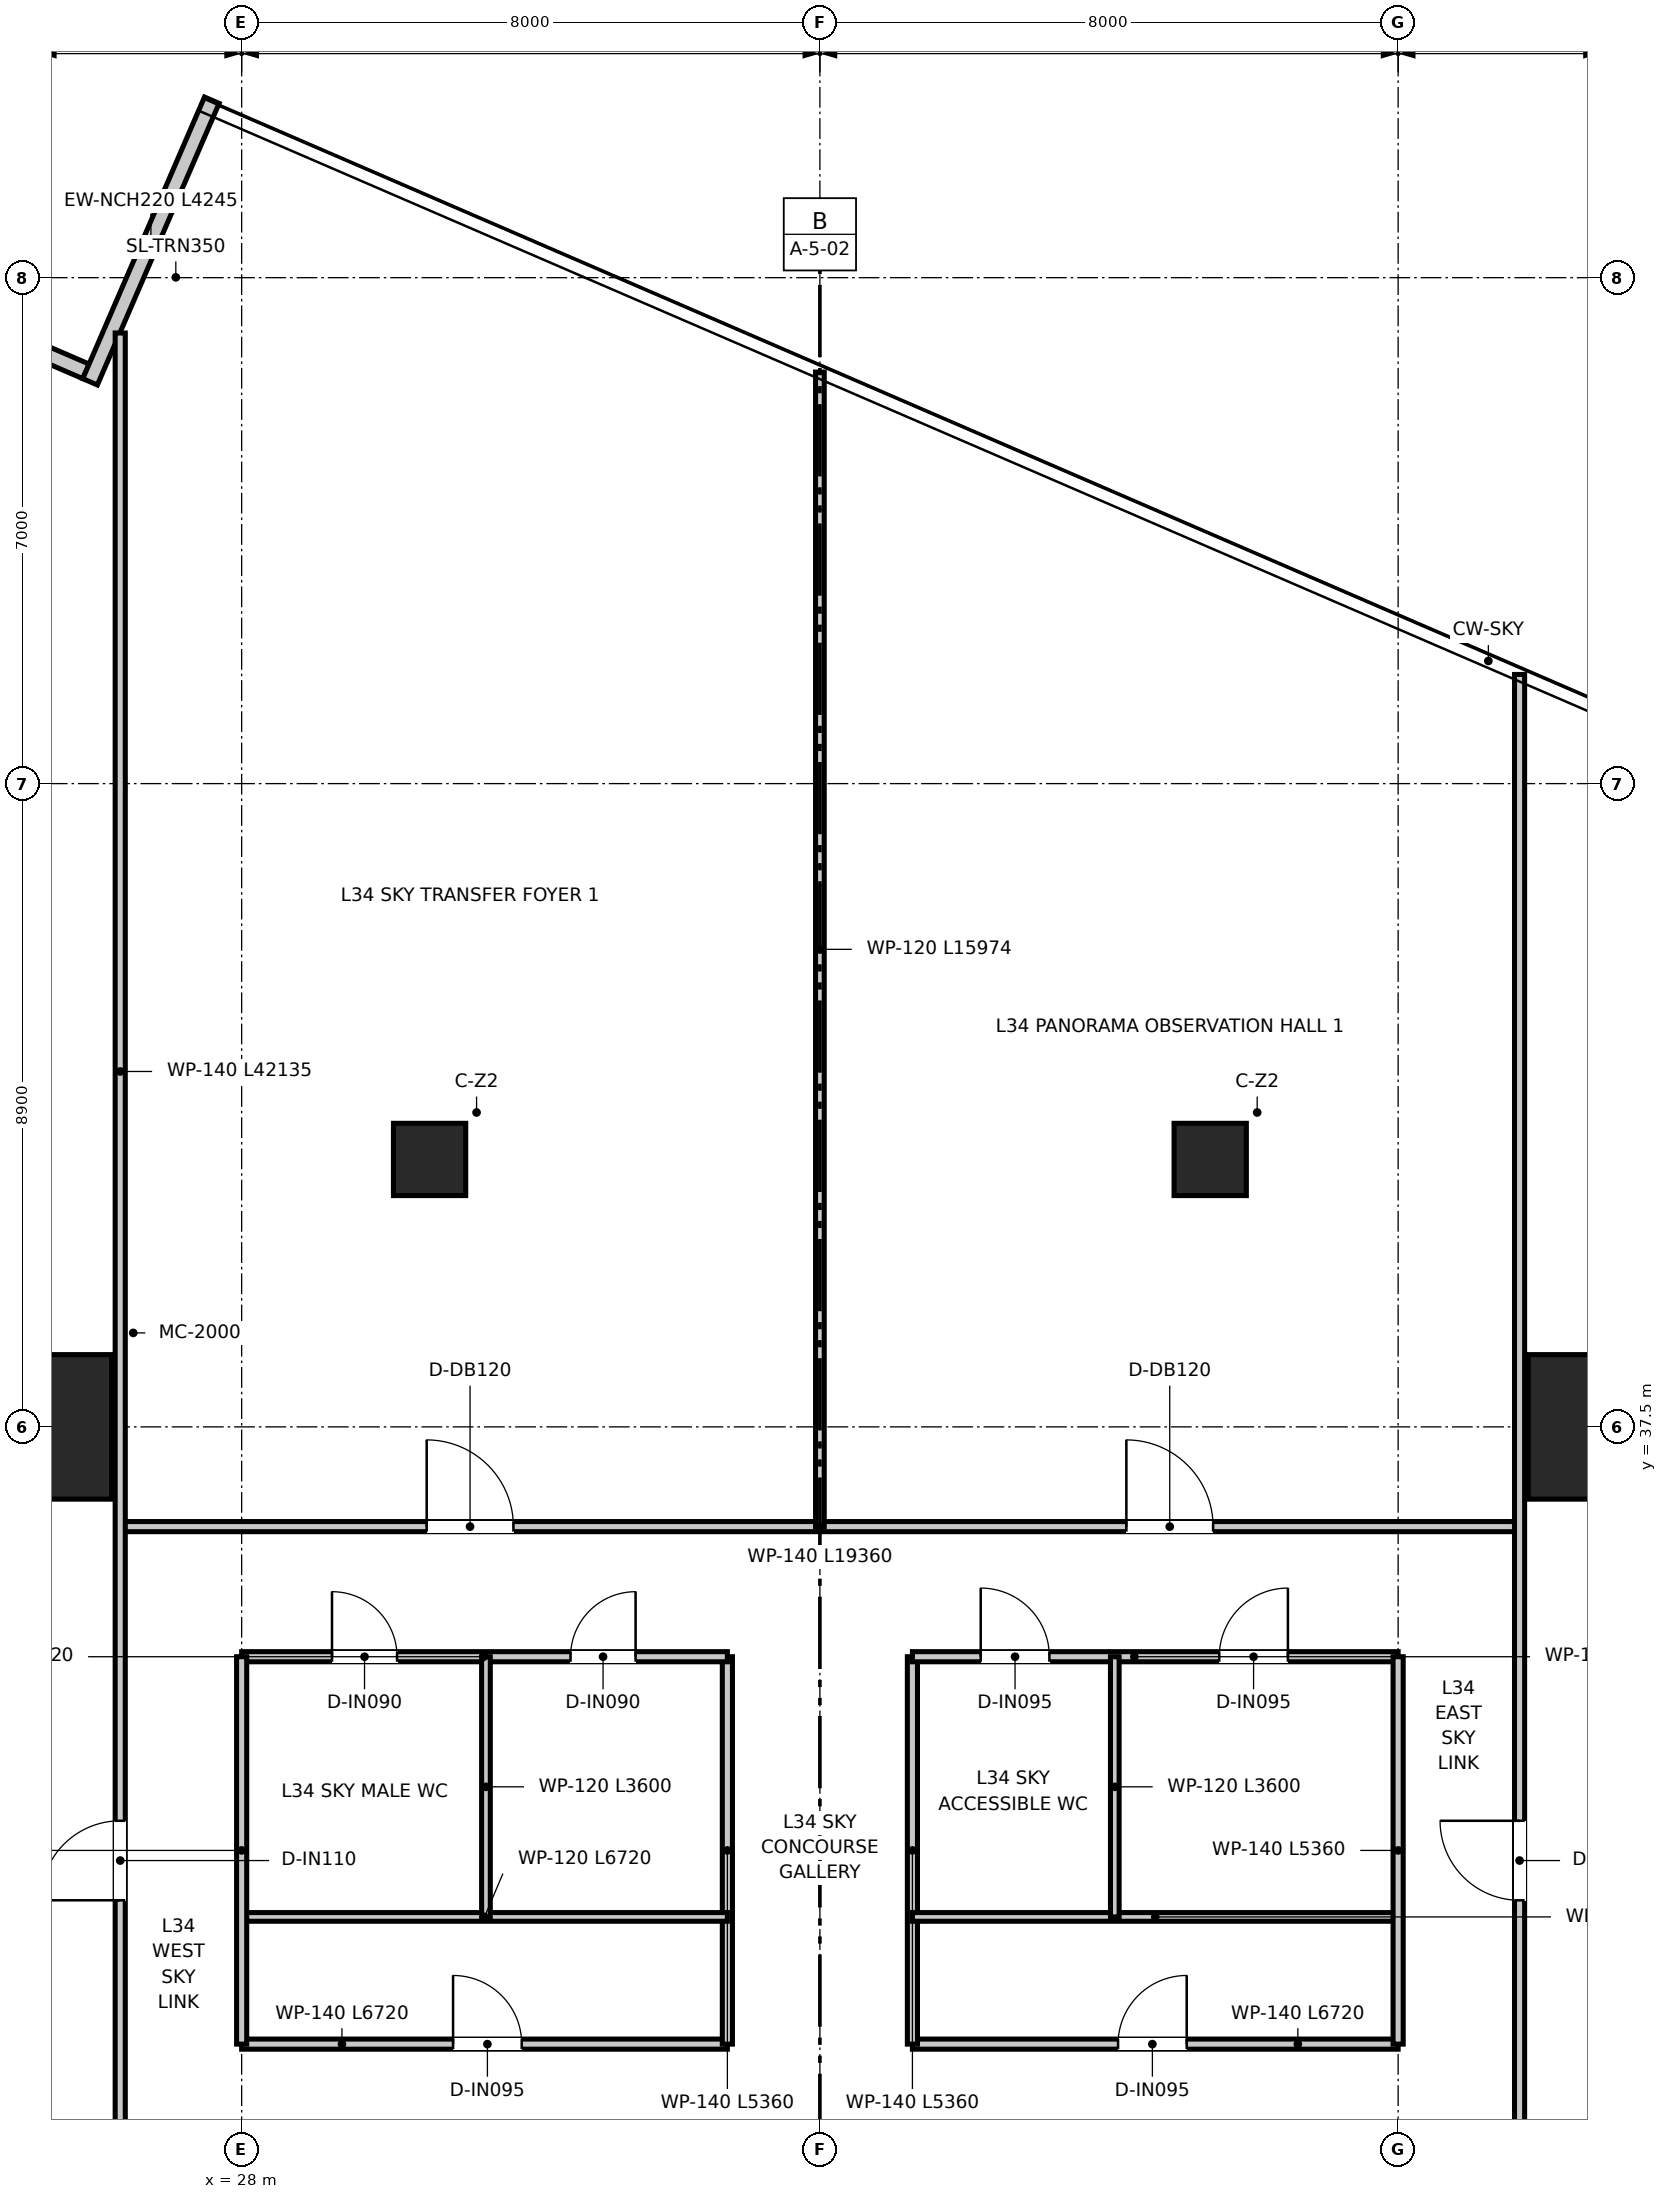
"""IFC4 building model, lengths in metres.
Left out: names, types, materials, properties, quantities, classifications, styles, units other than length and angle.
Written with IfcOpenShell. Run it as: python <this file> out.ifc"""

import sys

from ifc_helpers import new_model, si_unit, direction, frame, frame_2d, origin, origin_2d, place, context, subcontext, project, spatial, rectangle, extrude, source, transform, mapped, element, fill, save


model = new_model("IFC4")
c1 = context("Model", 3, precision=1e-05, world=origin(), true_north=direction((0.0, 1.0)))
c2 = subcontext(c1, "Body", "Model", "MODEL_VIEW")
j1 = project(units=[si_unit("LENGTHUNIT", "METRE"), si_unit("PLANEANGLEUNIT", "RADIAN")], contexts=[c1])
p1 = place(None, origin())
s1 = spatial("IfcSite", under=j1, at=p1, CompositionType="ELEMENT")
p2 = place(p1, origin())
s2 = spatial("IfcBuilding", under=s1, at=p2, CompositionType="ELEMENT")
p3 = place(p2, frame((0.0, 0.0, 141.4)))
s3 = spatial("IfcBuildingStorey", under=s2, at=p3, CompositionType="ELEMENT", Elevation=141.4)
m1 = source(origin(), c2, "Body", "SweptSolid", [
    extrude(rectangle(XDim=2.0, YDim=2.0, at=origin_2d()), origin(), (0.0, 0.0, 1.0), 4.8),
])
for number, where, z_axis, x_axis in (
    (1, (46.8, 37.5, 0.0), (0.0, 0.0, 1.0), (1.0, 0.0, 0.0)),
    (2, (25.2, 37.5, 0.0), (0.0, 0.0, 1.0), (1.0, 0.0, 0.0)),
):
    element("IfcColumn", number, at=place(p3, frame(where, z_axis=z_axis, x_axis=x_axis)), inside=s3, PredefinedType="USERDEFINED", context=c2, shape_type="MappedRepresentation", body=[
        mapped(m1, transform((0.0, 0.0, 0.0), x_axis=(1.0, 0.0, 0.0), y_axis=(0.0, 1.0, 0.0), z_axis=(0.0, 0.0, 1.0), scale=1.0)),
    ])
m2 = source(origin(), c2, "Body", "SweptSolid", [
    extrude(rectangle(XDim=1.0, YDim=1.0, at=origin_2d()), origin(), (0.0, 0.0, 1.0), 4.8),
])
for number, where, z_axis, x_axis in (
    (3, (30.6, 41.2, 0.0), (0.0, 0.0, 1.0), (1.0, 0.0, 0.0)),
    (4, (41.4, 41.2, 0.0), (0.0, 0.0, 1.0), (1.0, 0.0, 0.0)),
):
    element("IfcColumn", number, at=place(p3, frame(where, z_axis=z_axis, x_axis=x_axis)), inside=s3, PredefinedType="COLUMN", context=c2, shape_type="MappedRepresentation", body=[
        mapped(m2, transform((0.0, 0.0, 0.0), x_axis=(1.0, 0.0, 0.0), y_axis=(0.0, 1.0, 0.0), z_axis=(0.0, 0.0, 1.0), scale=1.0)),
    ])
p4 = place(p3, frame((25.845, 52.104, 0.0), z_axis=(0.0, 0.0, 1.0), x_axis=(-0.91792331666, 0.396757841424, 0.0)))
e5 = element("IfcWall", 5, at=p4, inside=s3, PredefinedType="ELEMENTEDWALL", context=c2, shape_type="SweptSolid", body=[
    extrude(rectangle(XDim=4.025, YDim=0.22, at=frame_2d((2.012, 0.0))), origin(), (0.0, 0.0, 1.0), 4.52),
])
p5 = place(p3, frame((27.587, 55.856, 0.0), z_axis=(0.0, 0.0, 1.0), x_axis=(-0.396735661984, -0.917932903054, 0.0)))
e6 = element("IfcWall", 6, at=p5, inside=s3, PredefinedType="ELEMENTEDWALL", context=c2, shape_type="SweptSolid", body=[
    extrude(rectangle(XDim=4.245, YDim=0.22, at=frame_2d((2.123, 0.0))), origin(), (0.0, 0.0, 1.0), 4.52),
])
p6 = place(p3, frame((28.0, 28.96, 0.0), z_axis=(0.0, 0.0, 1.0), x_axis=(1.0, 0.0, 0.0)))
e7 = element("IfcWall", 7, at=p6, inside=s3, PredefinedType="PARTITIONING", context=c2, shape_type="SweptSolid", body=[
    extrude(rectangle(XDim=6.72, YDim=0.14, at=frame_2d((3.36, 0.0))), origin(), (0.0, 0.0, 1.0), 3.93),
])
p7 = place(p6, frame((2.925, 0.0, 0.0)))
e8 = element("IfcOpeningElement", 8, at=p7, cuts=e7, PredefinedType="OPENING", context=c2, shape_type="SweptSolid", body=[
    extrude(rectangle(XDim=0.95, YDim=2.1, at=frame_2d((0.475, 1.05))), frame((0.0, 0.08, 0.0), z_axis=(0.0, -1.0, 0.0), x_axis=(1.0, 0.0, 0.0)), (0.0, 0.0, 1.0), 0.16),
])
p8 = place(p3, frame((37.28, 28.96, 0.0), z_axis=(0.0, 0.0, 1.0), x_axis=(1.0, 0.0, 0.0)))
e9 = element("IfcWall", 9, at=p8, inside=s3, PredefinedType="PARTITIONING", context=c2, shape_type="SweptSolid", body=[
    extrude(rectangle(XDim=6.72, YDim=0.14, at=frame_2d((3.36, 0.0))), origin(), (0.0, 0.0, 1.0), 3.93),
])
p9 = place(p8, frame((2.845, 0.0, 0.0)))
e10 = element("IfcOpeningElement", 10, at=p9, cuts=e9, PredefinedType="OPENING", context=c2, shape_type="SweptSolid", body=[
    extrude(rectangle(XDim=0.95, YDim=2.1, at=frame_2d((0.475, 1.05))), frame((0.0, 0.08, 0.0), z_axis=(0.0, -1.0, 0.0), x_axis=(1.0, 0.0, 0.0)), (0.0, 0.0, 1.0), 0.16),
])
for number, where, z_axis, x_axis in (
    (11, (34.72, 28.96, 0.0), (0.0, 0.0, 1.0), (0.0, 1.0, 0.0)),
    (12, (37.28, 28.96, 0.0), (0.0, 0.0, 1.0), (0.0, 1.0, 0.0)),
):
    element("IfcWall", number, at=place(p3, frame(where, z_axis=z_axis, x_axis=x_axis)), inside=s3, PredefinedType="PARTITIONING", context=c2, shape_type="SweptSolid", body=[
        extrude(rectangle(XDim=5.36, YDim=0.14, at=frame_2d((2.68, 0.0))), origin(), (0.0, 0.0, 1.0), 4.02),
    ])
for number, where, z_axis, x_axis in (
    (13, (28.0, 30.72, 0.0), (0.0, 0.0, 1.0), (1.0, 0.0, 0.0)),
    (14, (37.28, 30.72, 0.0), (0.0, 0.0, 1.0), (1.0, 0.0, 0.0)),
):
    element("IfcWall", number, at=place(p3, frame(where, z_axis=z_axis, x_axis=x_axis)), inside=s3, PredefinedType="PARTITIONING", context=c2, shape_type="SweptSolid", body=[
        extrude(rectangle(XDim=6.72, YDim=0.12, at=frame_2d((3.36, 0.0))), origin(), (0.0, 0.0, 1.0), 3.93),
    ])
p10 = place(p3, frame((28.0, 34.32, 0.0), z_axis=(0.0, 0.0, 1.0), x_axis=(1.0, 0.0, 0.0)))
e15 = element("IfcWall", 15, at=p10, inside=s3, PredefinedType="PARTITIONING", context=c2, shape_type="SweptSolid", body=[
    extrude(rectangle(XDim=6.72, YDim=0.14, at=frame_2d((3.36, 0.0))), origin(), (0.0, 0.0, 1.0), 3.93),
])
p11 = place(p10, frame((1.25, 0.0, 0.0)))
e16 = element("IfcOpeningElement", 16, at=p11, cuts=e15, PredefinedType="OPENING", context=c2, shape_type="SweptSolid", body=[
    extrude(rectangle(XDim=0.9, YDim=2.1, at=frame_2d((0.45, 1.05))), frame((0.0, 0.08, 0.0), z_axis=(0.0, -1.0, 0.0), x_axis=(1.0, 0.0, 0.0)), (0.0, 0.0, 1.0), 0.16),
])
p12 = place(p10, frame((4.55, 0.0, 0.0)))
e17 = element("IfcOpeningElement", 17, at=p12, cuts=e15, PredefinedType="OPENING", context=c2, shape_type="SweptSolid", body=[
    extrude(rectangle(XDim=0.9, YDim=2.1, at=frame_2d((0.45, 1.05))), frame((0.0, 0.08, 0.0), z_axis=(0.0, -1.0, 0.0), x_axis=(1.0, 0.0, 0.0)), (0.0, 0.0, 1.0), 0.16),
])
p13 = place(p3, frame((37.28, 34.32, 0.0), z_axis=(0.0, 0.0, 1.0), x_axis=(1.0, 0.0, 0.0)))
e18 = element("IfcWall", 18, at=p13, inside=s3, PredefinedType="PARTITIONING", context=c2, shape_type="SweptSolid", body=[
    extrude(rectangle(XDim=6.72, YDim=0.14, at=frame_2d((3.36, 0.0))), origin(), (0.0, 0.0, 1.0), 3.93),
])
p14 = place(p13, frame((0.945, 0.0, 0.0)))
e19 = element("IfcOpeningElement", 19, at=p14, cuts=e18, PredefinedType="OPENING", context=c2, shape_type="SweptSolid", body=[
    extrude(rectangle(XDim=0.95, YDim=2.1, at=frame_2d((0.475, 1.05))), frame((0.0, 0.08, 0.0), z_axis=(0.0, -1.0, 0.0), x_axis=(1.0, 0.0, 0.0)), (0.0, 0.0, 1.0), 0.16),
])
p15 = place(p13, frame((4.245, 0.0, 0.0)))
e20 = element("IfcOpeningElement", 20, at=p15, cuts=e18, PredefinedType="OPENING", context=c2, shape_type="SweptSolid", body=[
    extrude(rectangle(XDim=0.95, YDim=2.1, at=frame_2d((0.475, 1.05))), frame((0.0, 0.08, 0.0), z_axis=(0.0, -1.0, 0.0), x_axis=(1.0, 0.0, 0.0)), (0.0, 0.0, 1.0), 0.16),
])
for number, where, z_axis, x_axis in (
    (21, (28.0, 28.96, 0.0), (0.0, 0.0, 1.0), (0.0, 1.0, 0.0)),
    (22, (44.0, 28.96, 0.0), (0.0, 0.0, 1.0), (0.0, 1.0, 0.0)),
):
    element("IfcWall", number, at=place(p3, frame(where, z_axis=z_axis, x_axis=x_axis)), inside=s3, PredefinedType="PARTITIONING", context=c2, shape_type="SweptSolid", body=[
        extrude(rectangle(XDim=5.36, YDim=0.14, at=frame_2d((2.68, 0.0))), origin(), (0.0, 0.0, 1.0), 4.12),
    ])
for number, where, z_axis, x_axis in (
    (23, (31.38, 30.72, 0.0), (0.0, 0.0, 1.0), (0.0, 1.0, 0.0)),
    (24, (40.08, 30.72, 0.0), (0.0, 0.0, 1.0), (0.0, 1.0, 0.0)),
):
    element("IfcWall", number, at=place(p3, frame(where, z_axis=z_axis, x_axis=x_axis)), inside=s3, PredefinedType="PARTITIONING", context=c2, shape_type="SweptSolid", body=[
        extrude(rectangle(XDim=3.6, YDim=0.12, at=frame_2d((1.8, 0.0))), origin(), (0.0, 0.0, 1.0), 4.02),
    ])
p16 = place(p3, frame((26.32, 36.12, 0.0), z_axis=(0.0, 0.0, 1.0), x_axis=(1.0, 0.0, 0.0)))
e25 = element("IfcWall", 25, at=p16, inside=s3, PredefinedType="PARTITIONING", context=c2, shape_type="SweptSolid", body=[
    extrude(rectangle(XDim=19.36, YDim=0.14, at=frame_2d((9.68, 0.0))), origin(), (0.0, 0.0, 1.0), 3.93),
])
p17 = place(p16, frame((4.24, 0.0, 0.0)))
e26 = element("IfcOpeningElement", 26, at=p17, cuts=e25, PredefinedType="OPENING", context=c2, shape_type="SweptSolid", body=[
    extrude(rectangle(XDim=1.2, YDim=2.15, at=frame_2d((0.6, 1.075))), frame((0.0, 0.08, 0.0), z_axis=(0.0, -1.0, 0.0), x_axis=(1.0, 0.0, 0.0)), (0.0, 0.0, 1.0), 0.16),
])
p18 = place(p16, frame((13.92, 0.0, 0.0)))
e27 = element("IfcOpeningElement", 27, at=p18, cuts=e25, PredefinedType="OPENING", context=c2, shape_type="SweptSolid", body=[
    extrude(rectangle(XDim=1.2, YDim=2.15, at=frame_2d((0.6, 1.075))), frame((0.0, 0.08, 0.0), z_axis=(0.0, -1.0, 0.0), x_axis=(1.0, 0.0, 0.0)), (0.0, 0.0, 1.0), 0.16),
])
p19 = place(p3, frame((26.32, 10.5, 0.0), z_axis=(0.0, 0.0, 1.0), x_axis=(0.0, 1.0, 0.0)))
e28 = element("IfcWall", 28, at=p19, inside=s3, PredefinedType="PARTITIONING", context=c2, shape_type="SweptSolid", body=[
    extrude(rectangle(XDim=42.135, YDim=0.14, at=frame_2d((21.067, 0.0))), origin(), (0.0, 0.0, 1.0), 3.82),
])
p20 = place(p19, frame((20.45, 0.0, 0.0)))
e29 = element("IfcOpeningElement", 29, at=p20, cuts=e28, PredefinedType="OPENING", context=c2, shape_type="SweptSolid", body=[
    extrude(rectangle(XDim=1.1, YDim=2.15, at=frame_2d((0.55, 1.075))), frame((0.0, 0.08, 0.0), z_axis=(0.0, -1.0, 0.0), x_axis=(1.0, 0.0, 0.0)), (0.0, 0.0, 1.0), 0.16),
])
p21 = place(p3, frame((45.68, 0.765, 0.0), z_axis=(0.0, 0.0, 1.0), x_axis=(0.0, 1.0, 0.0)))
e30 = element("IfcWall", 30, at=p21, inside=s3, PredefinedType="PARTITIONING", context=c2, shape_type="SweptSolid", body=[
    extrude(rectangle(XDim=47.145, YDim=0.14, at=frame_2d((23.573, 0.0))), origin(), (0.0, 0.0, 1.0), 3.82),
])
p22 = place(p21, frame((30.185, 0.0, 0.0)))
e31 = element("IfcOpeningElement", 31, at=p22, cuts=e30, PredefinedType="OPENING", context=c2, shape_type="SweptSolid", body=[
    extrude(rectangle(XDim=1.1, YDim=2.15, at=frame_2d((0.55, 1.075))), frame((0.0, 0.08, 0.0), z_axis=(0.0, -1.0, 0.0), x_axis=(1.0, 0.0, 0.0)), (0.0, 0.0, 1.0), 0.16),
])
p23 = place(p3, frame((36.0, 36.12, 0.0), z_axis=(0.0, 0.0, 1.0), x_axis=(0.0, 1.0, 0.0)))
e32 = element("IfcWall", 32, at=p23, inside=s3, PredefinedType="PARTITIONING", context=c2, shape_type="SweptSolid", body=[
    extrude(rectangle(XDim=15.974, YDim=0.12, at=frame_2d((7.987, 0.0))), origin(), (0.0, 0.0, 1.0), 3.82),
])
p24 = place(p7, origin())
e33 = element("IfcDoor", 33, at=p24, inside=s3, OperationType="SINGLE_SWING_LEFT", PredefinedType="DOOR", context=c2, shape_type="SweptSolid", body=[
    extrude(rectangle(XDim=0.95, YDim=2.1, at=frame_2d((0.475, 1.05))), frame((0.0, 0.025, 0.0), z_axis=(0.0, -1.0, 0.0), x_axis=(1.0, 0.0, 0.0)), (0.0, 0.0, 1.0), 0.05),
])
fill(e8, e33)
p25 = place(p9, origin())
e34 = element("IfcDoor", 34, at=p25, inside=s3, OperationType="SINGLE_SWING_RIGHT", PredefinedType="DOOR", context=c2, shape_type="SweptSolid", body=[
    extrude(rectangle(XDim=0.95, YDim=2.1, at=frame_2d((0.475, 1.05))), frame((0.0, 0.025, 0.0), z_axis=(0.0, -1.0, 0.0), x_axis=(1.0, 0.0, 0.0)), (0.0, 0.0, 1.0), 0.05),
])
fill(e10, e34)
p26 = place(p11, origin())
e35 = element("IfcDoor", 35, at=p26, inside=s3, OperationType="SINGLE_SWING_LEFT", PredefinedType="DOOR", context=c2, shape_type="SweptSolid", body=[
    extrude(rectangle(XDim=0.9, YDim=2.1, at=frame_2d((0.45, 1.05))), frame((0.0, 0.025, 0.0), z_axis=(0.0, -1.0, 0.0), x_axis=(1.0, 0.0, 0.0)), (0.0, 0.0, 1.0), 0.05),
])
fill(e16, e35)
p27 = place(p12, origin())
e36 = element("IfcDoor", 36, at=p27, inside=s3, OperationType="SINGLE_SWING_RIGHT", PredefinedType="DOOR", context=c2, shape_type="SweptSolid", body=[
    extrude(rectangle(XDim=0.9, YDim=2.1, at=frame_2d((0.45, 1.05))), frame((0.0, 0.025, 0.0), z_axis=(0.0, -1.0, 0.0), x_axis=(1.0, 0.0, 0.0)), (0.0, 0.0, 1.0), 0.05),
])
fill(e17, e36)
p28 = place(p14, origin())
e37 = element("IfcDoor", 37, at=p28, inside=s3, OperationType="SINGLE_SWING_LEFT", PredefinedType="DOOR", context=c2, shape_type="SweptSolid", body=[
    extrude(rectangle(XDim=0.95, YDim=2.1, at=frame_2d((0.475, 1.05))), frame((0.0, 0.025, 0.0), z_axis=(0.0, -1.0, 0.0), x_axis=(1.0, 0.0, 0.0)), (0.0, 0.0, 1.0), 0.05),
])
fill(e19, e37)
p29 = place(p15, origin())
e38 = element("IfcDoor", 38, at=p29, inside=s3, OperationType="SINGLE_SWING_RIGHT", PredefinedType="DOOR", context=c2, shape_type="SweptSolid", body=[
    extrude(rectangle(XDim=0.95, YDim=2.1, at=frame_2d((0.475, 1.05))), frame((0.0, 0.025, 0.0), z_axis=(0.0, -1.0, 0.0), x_axis=(1.0, 0.0, 0.0)), (0.0, 0.0, 1.0), 0.05),
])
fill(e20, e38)
p30 = place(p17, origin())
e39 = element("IfcDoor", 39, at=p30, inside=s3, OperationType="SINGLE_SWING_LEFT", PredefinedType="DOOR", context=c2, shape_type="SweptSolid", body=[
    extrude(rectangle(XDim=1.2, YDim=2.15, at=frame_2d((0.6, 1.075))), frame((0.0, 0.025, 0.0), z_axis=(0.0, -1.0, 0.0), x_axis=(1.0, 0.0, 0.0)), (0.0, 0.0, 1.0), 0.05),
])
fill(e26, e39)
p31 = place(p18, origin())
e40 = element("IfcDoor", 40, at=p31, inside=s3, OperationType="SINGLE_SWING_LEFT", PredefinedType="DOOR", context=c2, shape_type="SweptSolid", body=[
    extrude(rectangle(XDim=1.2, YDim=2.15, at=frame_2d((0.6, 1.075))), frame((0.0, 0.025, 0.0), z_axis=(0.0, -1.0, 0.0), x_axis=(1.0, 0.0, 0.0)), (0.0, 0.0, 1.0), 0.05),
])
fill(e27, e40)
p32 = place(p20, origin())
e41 = element("IfcDoor", 41, at=p32, inside=s3, OperationType="SINGLE_SWING_LEFT", PredefinedType="DOOR", context=c2, shape_type="SweptSolid", body=[
    extrude(rectangle(XDim=1.1, YDim=2.15, at=frame_2d((0.55, 1.075))), frame((0.0, 0.025, 0.0), z_axis=(0.0, -1.0, 0.0), x_axis=(1.0, 0.0, 0.0)), (0.0, 0.0, 1.0), 0.05),
])
fill(e29, e41)
p33 = place(p22, origin())
e42 = element("IfcDoor", 42, at=p33, inside=s3, OperationType="SINGLE_SWING_RIGHT", PredefinedType="DOOR", context=c2, shape_type="SweptSolid", body=[
    extrude(rectangle(XDim=1.1, YDim=2.15, at=frame_2d((0.55, 1.075))), frame((0.0, 0.025, 0.0), z_axis=(0.0, -1.0, 0.0), x_axis=(1.0, 0.0, 0.0)), (0.0, 0.0, 1.0), 0.05),
])
fill(e31, e42)
save(model, sys.argv[1])
